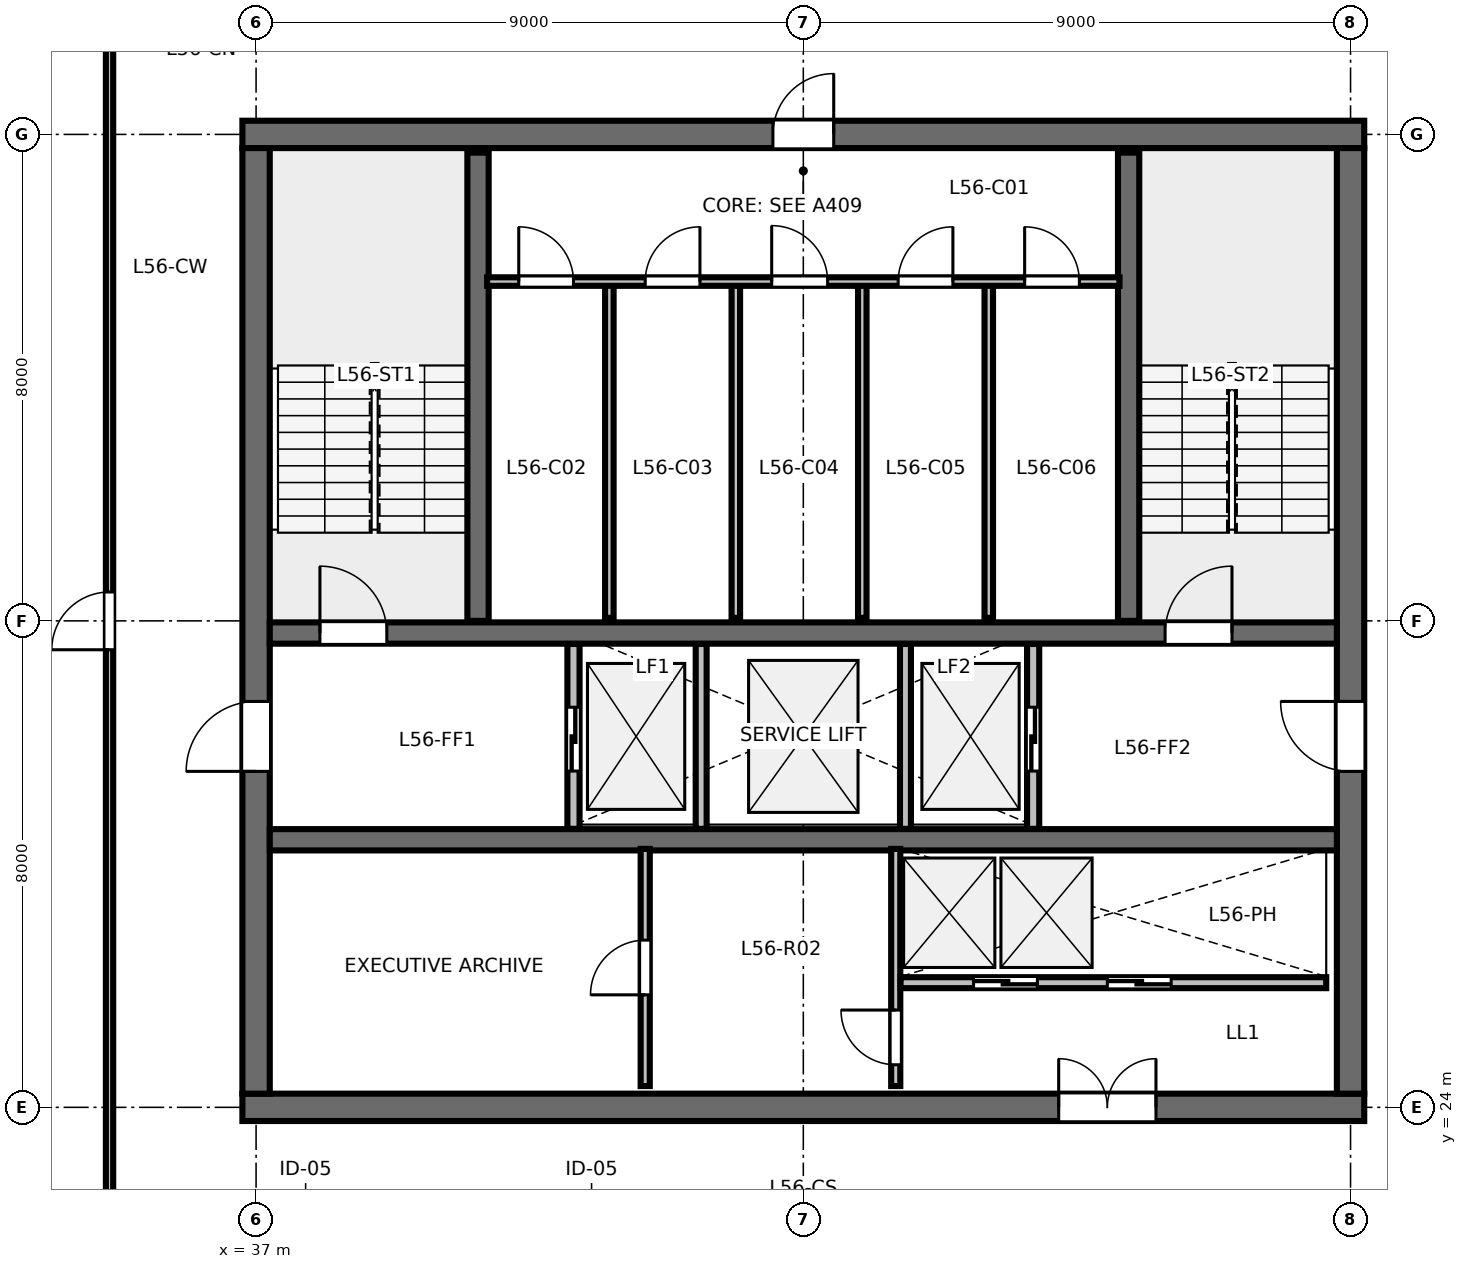
"""IFC4 building model, lengths in metres.
Left out: names, types, materials, properties, quantities, classifications, styles, units other than length and angle.
Written with IfcOpenShell. Run it as: python <this file> out.ifc"""

import sys

from ifc_helpers import new_model, si_unit, direction, frame, frame_2d, origin, place, context, subcontext, project, spatial, rectangle, extrude, element, fill, save


model = new_model("IFC4")
c1 = context("Model", 3, precision=1e-05, world=origin(), true_north=direction((0.0, 1.0)))
c2 = subcontext(c1, "Body", "Model", "MODEL_VIEW")
j1 = project(units=[si_unit("LENGTHUNIT", "METRE"), si_unit("PLANEANGLEUNIT", "RADIAN")], contexts=[c1])
p1 = place(None, origin())
s1 = spatial("IfcSite", under=j1, at=p1, CompositionType="ELEMENT")
p2 = place(p1, origin())
s2 = spatial("IfcBuilding", under=s1, at=p2, CompositionType="ELEMENT")
p3 = place(p2, frame((0.0, 0.0, 213.0)))
s3 = spatial("IfcBuildingStorey", under=s2, at=p3, CompositionType="ELEMENT", Elevation=213.0)
p4 = place(p3, frame((36.775, 24.0, 0.0), z_axis=(0.0, 0.0, 1.0), x_axis=(1.0, 0.0, 0.0)))
e1 = element("IfcWall", 1, at=p4, inside=s3, PredefinedType="SHEAR", context=c2, shape_type="SweptSolid", body=[
    extrude(rectangle(XDim=18.45, YDim=0.45, at=frame_2d((9.225, 0.0))), origin(), (0.0, 0.0, 1.0), 3.36),
])
p5 = place(p4, frame((13.425, 0.0, 0.0)))
e2 = element("IfcOpeningElement", 2, at=p5, cuts=e1, PredefinedType="OPENING", context=c2, shape_type="SweptSolid", body=[
    extrude(rectangle(XDim=1.6, YDim=2.15, at=frame_2d((0.8, 1.075))), frame((0.0, 0.235, 0.0), z_axis=(0.0, -1.0, 0.0), x_axis=(1.0, 0.0, 0.0)), (0.0, 0.0, 1.0), 0.47),
])
p6 = place(p3, frame((36.775, 40.0, 0.0), z_axis=(0.0, 0.0, 1.0), x_axis=(1.0, 0.0, 0.0)))
e3 = element("IfcWall", 3, at=p6, inside=s3, PredefinedType="SHEAR", context=c2, shape_type="SweptSolid", body=[
    extrude(rectangle(XDim=18.45, YDim=0.45, at=frame_2d((9.225, 0.0))), origin(), (0.0, 0.0, 1.0), 3.36),
])
p7 = place(p6, frame((8.725, 0.0, 0.0)))
e4 = element("IfcOpeningElement", 4, at=p7, cuts=e3, PredefinedType="OPENING", context=c2, shape_type="SweptSolid", body=[
    extrude(rectangle(XDim=1.0, YDim=2.15, at=frame_2d((0.5, 1.075))), frame((0.0, 0.235, 0.0), z_axis=(0.0, -1.0, 0.0), x_axis=(1.0, 0.0, 0.0)), (0.0, 0.0, 1.0), 0.47),
])
p8 = place(p3, frame((37.0, 24.225, 0.0), z_axis=(0.0, 0.0, 1.0), x_axis=(0.0, 1.0, 0.0)))
e5 = element("IfcWall", 5, at=p8, inside=s3, PredefinedType="SHEAR", context=c2, shape_type="SweptSolid", body=[
    extrude(rectangle(XDim=15.55, YDim=0.45, at=frame_2d((7.775, 0.0))), origin(), (0.0, 0.0, 1.0), 3.36),
])
p9 = place(p8, frame((5.3, 0.0, 0.0)))
e6 = element("IfcOpeningElement", 6, at=p9, cuts=e5, PredefinedType="OPENING", context=c2, shape_type="SweptSolid", body=[
    extrude(rectangle(XDim=1.15, YDim=2.15, at=frame_2d((0.575, 1.075))), frame((0.0, 0.235, 0.0), z_axis=(0.0, -1.0, 0.0), x_axis=(1.0, 0.0, 0.0)), (0.0, 0.0, 1.0), 0.47),
])
p10 = place(p3, frame((55.0, 24.225, 0.0), z_axis=(0.0, 0.0, 1.0), x_axis=(0.0, 1.0, 0.0)))
e7 = element("IfcWall", 7, at=p10, inside=s3, PredefinedType="SHEAR", context=c2, shape_type="SweptSolid", body=[
    extrude(rectangle(XDim=15.55, YDim=0.45, at=frame_2d((7.775, 0.0))), origin(), (0.0, 0.0, 1.0), 3.36),
])
p11 = place(p10, frame((5.3, 0.0, 0.0)))
e8 = element("IfcOpeningElement", 8, at=p11, cuts=e7, PredefinedType="OPENING", context=c2, shape_type="SweptSolid", body=[
    extrude(rectangle(XDim=1.15, YDim=2.15, at=frame_2d((0.575, 1.075))), frame((0.0, 0.235, 0.0), z_axis=(0.0, -1.0, 0.0), x_axis=(1.0, 0.0, 0.0)), (0.0, 0.0, 1.0), 0.47),
])
p12 = place(p3, frame((37.225, 31.8, 0.0), z_axis=(0.0, 0.0, 1.0), x_axis=(1.0, 0.0, 0.0)))
e9 = element("IfcWall", 9, at=p12, inside=s3, PredefinedType="SHEAR", context=c2, shape_type="SweptSolid", body=[
    extrude(rectangle(XDim=17.55, YDim=0.35, at=frame_2d((8.775, 0.0))), origin(), (0.0, 0.0, 1.0), 3.36),
])
p13 = place(p12, frame((0.825, 0.0, 0.0)))
e10 = element("IfcOpeningElement", 10, at=p13, cuts=e9, PredefinedType="OPENING", context=c2, shape_type="SweptSolid", body=[
    extrude(rectangle(XDim=1.1, YDim=2.15, at=frame_2d((0.55, 1.075))), frame((0.0, 0.185, 0.0), z_axis=(0.0, -1.0, 0.0), x_axis=(1.0, 0.0, 0.0)), (0.0, 0.0, 1.0), 0.37),
])
p14 = place(p12, frame((14.725, 0.0, 0.0)))
e11 = element("IfcOpeningElement", 11, at=p14, cuts=e9, PredefinedType="OPENING", context=c2, shape_type="SweptSolid", body=[
    extrude(rectangle(XDim=1.1, YDim=2.15, at=frame_2d((0.55, 1.075))), frame((0.0, 0.185, 0.0), z_axis=(0.0, -1.0, 0.0), x_axis=(1.0, 0.0, 0.0)), (0.0, 0.0, 1.0), 0.37),
])
p15 = place(p3, frame((37.225, 28.4, 0.0), z_axis=(0.0, 0.0, 1.0), x_axis=(1.0, 0.0, 0.0)))
e12 = element("IfcWall", 12, at=p15, inside=s3, PredefinedType="SHEAR", context=c2, shape_type="SweptSolid", body=[
    extrude(rectangle(XDim=17.55, YDim=0.35, at=frame_2d((8.775, 0.0))), origin(), (0.0, 0.0, 1.0), 3.36),
])
for number, where, z_axis, x_axis in (
    (13, (40.65, 32.0, 0.0), (0.0, 0.0, 1.0), (0.0, 1.0, 0.0)),
    (14, (51.35, 32.0, 0.0), (0.0, 0.0, 1.0), (0.0, 1.0, 0.0)),
):
    element("IfcWall", number, at=place(p3, frame(where, z_axis=z_axis, x_axis=x_axis)), inside=s3, PredefinedType="SHEAR", context=c2, shape_type="SweptSolid", body=[
        extrude(rectangle(XDim=7.7, YDim=0.35, at=frame_2d((3.85, 0.0))), origin(), (0.0, 0.0, 1.0), 3.6),
    ])
for number, where, z_axis, x_axis in (
    (15, (42.81, 32.05, 0.0), (0.0, 0.0, 1.0), (0.0, 1.0, 0.0)),
    (16, (44.89, 32.05, 0.0), (0.0, 0.0, 1.0), (0.0, 1.0, 0.0)),
    (17, (46.97, 32.05, 0.0), (0.0, 0.0, 1.0), (0.0, 1.0, 0.0)),
    (18, (49.05, 32.05, 0.0), (0.0, 0.0, 1.0), (0.0, 1.0, 0.0)),
):
    element("IfcWall", number, at=place(p3, frame(where, z_axis=z_axis, x_axis=x_axis)), inside=s3, PredefinedType="PARTITIONING", context=c2, shape_type="SweptSolid", body=[
        extrude(rectangle(XDim=5.5, YDim=0.14, at=frame_2d((2.75, 0.0))), origin(), (0.0, 0.0, 1.0), 3.375),
    ])
p16 = place(p3, frame((40.8, 37.58, 0.0), z_axis=(0.0, 0.0, 1.0), x_axis=(1.0, 0.0, 0.0)))
e19 = element("IfcWall", 19, at=p16, inside=s3, PredefinedType="PARTITIONING", context=c2, shape_type="SweptSolid", body=[
    extrude(rectangle(XDim=10.4, YDim=0.14, at=frame_2d((5.2, 0.0))), origin(), (0.0, 0.0, 1.0), 3.375),
])
p17 = place(p16, frame((0.52, 0.0, 0.0)))
e20 = element("IfcOpeningElement", 20, at=p17, cuts=e19, PredefinedType="OPENING", context=c2, shape_type="SweptSolid", body=[
    extrude(rectangle(XDim=0.9, YDim=2.15, at=frame_2d((0.45, 1.075))), frame((0.0, 0.08, 0.0), z_axis=(0.0, -1.0, 0.0), x_axis=(1.0, 0.0, 0.0)), (0.0, 0.0, 1.0), 0.16),
])
p18 = place(p16, frame((2.6, 0.0, 0.0)))
e21 = element("IfcOpeningElement", 21, at=p18, cuts=e19, PredefinedType="OPENING", context=c2, shape_type="SweptSolid", body=[
    extrude(rectangle(XDim=0.9, YDim=2.15, at=frame_2d((0.45, 1.075))), frame((0.0, 0.08, 0.0), z_axis=(0.0, -1.0, 0.0), x_axis=(1.0, 0.0, 0.0)), (0.0, 0.0, 1.0), 0.16),
])
p19 = place(p16, frame((4.68, 0.0, 0.0)))
e22 = element("IfcOpeningElement", 22, at=p19, cuts=e19, PredefinedType="OPENING", context=c2, shape_type="SweptSolid", body=[
    extrude(rectangle(XDim=0.92, YDim=2.15, at=frame_2d((0.46, 1.075))), frame((0.0, 0.08, 0.0), z_axis=(0.0, -1.0, 0.0), x_axis=(1.0, 0.0, 0.0)), (0.0, 0.0, 1.0), 0.16),
])
p20 = place(p16, frame((6.76, 0.0, 0.0)))
e23 = element("IfcOpeningElement", 23, at=p20, cuts=e19, PredefinedType="OPENING", context=c2, shape_type="SweptSolid", body=[
    extrude(rectangle(XDim=0.9, YDim=2.15, at=frame_2d((0.45, 1.075))), frame((0.0, 0.08, 0.0), z_axis=(0.0, -1.0, 0.0), x_axis=(1.0, 0.0, 0.0)), (0.0, 0.0, 1.0), 0.16),
])
p21 = place(p16, frame((8.84, 0.0, 0.0)))
e24 = element("IfcOpeningElement", 24, at=p21, cuts=e19, PredefinedType="OPENING", context=c2, shape_type="SweptSolid", body=[
    extrude(rectangle(XDim=0.9, YDim=2.15, at=frame_2d((0.45, 1.075))), frame((0.0, 0.08, 0.0), z_axis=(0.0, -1.0, 0.0), x_axis=(1.0, 0.0, 0.0)), (0.0, 0.0, 1.0), 0.16),
])
p22 = place(p3, frame((42.22, 28.58, 0.0), z_axis=(0.0, 0.0, 1.0), x_axis=(0.0, 1.0, 0.0)))
e25 = element("IfcWall", 25, at=p22, inside=s3, PredefinedType="PARTITIONING", context=c2, shape_type="SweptSolid", body=[
    extrude(rectangle(XDim=3.04, YDim=0.2, at=frame_2d((1.52, 0.0))), origin(), (0.0, 0.0, 1.0), 3.375),
])
p23 = place(p22, frame((0.95, 0.0, 0.0)))
e26 = element("IfcOpeningElement", 26, at=p23, cuts=e25, PredefinedType="OPENING", context=c2, shape_type="SweptSolid", body=[
    extrude(rectangle(XDim=1.05, YDim=2.15, at=frame_2d((0.525, 1.075))), frame((0.0, 0.11, 0.0), z_axis=(0.0, -1.0, 0.0), x_axis=(1.0, 0.0, 0.0)), (0.0, 0.0, 1.0), 0.22),
])
p24 = place(p3, frame((49.78, 28.58, 0.0), z_axis=(0.0, 0.0, 1.0), x_axis=(0.0, 1.0, 0.0)))
e27 = element("IfcWall", 27, at=p24, inside=s3, PredefinedType="PARTITIONING", context=c2, shape_type="SweptSolid", body=[
    extrude(rectangle(XDim=3.04, YDim=0.2, at=frame_2d((1.52, 0.0))), origin(), (0.0, 0.0, 1.0), 3.375),
])
p25 = place(p24, frame((0.95, 0.0, 0.0)))
e28 = element("IfcOpeningElement", 28, at=p25, cuts=e27, PredefinedType="OPENING", context=c2, shape_type="SweptSolid", body=[
    extrude(rectangle(XDim=1.05, YDim=2.15, at=frame_2d((0.525, 1.075))), frame((0.0, 0.11, 0.0), z_axis=(0.0, -1.0, 0.0), x_axis=(1.0, 0.0, 0.0)), (0.0, 0.0, 1.0), 0.22),
])
for number, where, z_axis, x_axis in (
    (29, (44.32, 28.58, 0.0), (0.0, 0.0, 1.0), (0.0, 1.0, 0.0)),
    (30, (47.68, 28.58, 0.0), (0.0, 0.0, 1.0), (0.0, 1.0, 0.0)),
):
    element("IfcWall", number, at=place(p3, frame(where, z_axis=z_axis, x_axis=x_axis)), inside=s3, PredefinedType="PARTITIONING", context=c2, shape_type="SweptSolid", body=[
        extrude(rectangle(XDim=3.04, YDim=0.18, at=frame_2d((1.52, 0.0))), origin(), (0.0, 0.0, 1.0), 3.375),
    ])
p26 = place(p3, frame((43.4, 24.35, 0.0), z_axis=(0.0, 0.0, 1.0), x_axis=(0.0, 1.0, 0.0)))
e31 = element("IfcWall", 31, at=p26, inside=s3, PredefinedType="PARTITIONING", context=c2, shape_type="SweptSolid", body=[
    extrude(rectangle(XDim=3.9, YDim=0.15, at=frame_2d((1.95, 0.0))), origin(), (0.0, 0.0, 1.0), 3.375),
])
p27 = place(p26, frame((1.5, 0.0, 0.0)))
e32 = element("IfcOpeningElement", 32, at=p27, cuts=e31, PredefinedType="OPENING", context=c2, shape_type="SweptSolid", body=[
    extrude(rectangle(XDim=0.9, YDim=2.15, at=frame_2d((0.45, 1.075))), frame((0.0, 0.085, 0.0), z_axis=(0.0, -1.0, 0.0), x_axis=(1.0, 0.0, 0.0)), (0.0, 0.0, 1.0), 0.17),
])
p28 = place(p3, frame((47.52, 24.35, 0.0), z_axis=(0.0, 0.0, 1.0), x_axis=(0.0, 1.0, 0.0)))
e33 = element("IfcWall", 33, at=p28, inside=s3, PredefinedType="PARTITIONING", context=c2, shape_type="SweptSolid", body=[
    extrude(rectangle(XDim=3.9, YDim=0.15, at=frame_2d((1.95, 0.0))), origin(), (0.0, 0.0, 1.0), 3.375),
])
p29 = place(p28, frame((0.35, 0.0, 0.0)))
e34 = element("IfcOpeningElement", 34, at=p29, cuts=e33, PredefinedType="OPENING", context=c2, shape_type="SweptSolid", body=[
    extrude(rectangle(XDim=0.9, YDim=2.15, at=frame_2d((0.45, 1.075))), frame((0.0, 0.085, 0.0), z_axis=(0.0, -1.0, 0.0), x_axis=(1.0, 0.0, 0.0)), (0.0, 0.0, 1.0), 0.17),
])
p30 = place(p3, frame((47.6, 26.05, 0.0), z_axis=(0.0, 0.0, 1.0), x_axis=(1.0, 0.0, 0.0)))
e35 = element("IfcWall", 35, at=p30, inside=s3, PredefinedType="PARTITIONING", context=c2, shape_type="SweptSolid", body=[
    extrude(rectangle(XDim=7.0, YDim=0.18, at=frame_2d((3.5, 0.0))), origin(), (0.0, 0.0, 1.0), 3.375),
])
p31 = place(p30, frame((1.2, 0.0, 0.0)))
e36 = element("IfcOpeningElement", 36, at=p31, cuts=e35, PredefinedType="OPENING", context=c2, shape_type="SweptSolid", body=[
    extrude(rectangle(XDim=1.05, YDim=2.15, at=frame_2d((0.525, 1.075))), frame((0.0, 0.1, 0.0), z_axis=(0.0, -1.0, 0.0), x_axis=(1.0, 0.0, 0.0)), (0.0, 0.0, 1.0), 0.2),
])
p32 = place(p30, frame((3.4, 0.0, 0.0)))
e37 = element("IfcOpeningElement", 37, at=p32, cuts=e35, PredefinedType="OPENING", context=c2, shape_type="SweptSolid", body=[
    extrude(rectangle(XDim=1.05, YDim=2.15, at=frame_2d((0.525, 1.075))), frame((0.0, 0.1, 0.0), z_axis=(0.0, -1.0, 0.0), x_axis=(1.0, 0.0, 0.0)), (0.0, 0.0, 1.0), 0.2),
])
p33 = place(p3, frame((34.59, 21.65, 0.0), z_axis=(0.0, 0.0, 1.0), x_axis=(0.0, 1.0, 0.0)))
e38 = element("IfcWall", 38, at=p33, inside=s3, PredefinedType="PARTITIONING", context=c2, shape_type="SweptSolid", body=[
    extrude(rectangle(XDim=20.7, YDim=0.12, at=frame_2d((10.35, 0.0))), origin(), (0.0, 0.0, 1.0), 2.655),
])
p34 = place(p33, frame((9.875, 0.0, 0.0)))
e39 = element("IfcOpeningElement", 39, at=p34, cuts=e38, PredefinedType="OPENING", context=c2, shape_type="SweptSolid", body=[
    extrude(rectangle(XDim=0.95, YDim=2.15, at=frame_2d((0.475, 1.075))), frame((0.0, 0.07, 0.0), z_axis=(0.0, -1.0, 0.0), x_axis=(1.0, 0.0, 0.0)), (0.0, 0.0, 1.0), 0.14),
])
p35 = place(p13, origin())
e40 = element("IfcDoor", 40, at=p35, inside=s3, OperationType="SINGLE_SWING_LEFT", PredefinedType="DOOR", context=c2, shape_type="SweptSolid", body=[
    extrude(rectangle(XDim=1.1, YDim=2.15, at=frame_2d((0.55, 1.075))), frame((0.0, 0.025, 0.0), z_axis=(0.0, -1.0, 0.0), x_axis=(1.0, 0.0, 0.0)), (0.0, 0.0, 1.0), 0.05),
])
fill(e10, e40)
p36 = place(p14, origin())
e41 = element("IfcDoor", 41, at=p36, inside=s3, OperationType="SINGLE_SWING_RIGHT", PredefinedType="DOOR", context=c2, shape_type="SweptSolid", body=[
    extrude(rectangle(XDim=1.1, YDim=2.15, at=frame_2d((0.55, 1.075))), frame((0.0, 0.025, 0.0), z_axis=(0.0, -1.0, 0.0), x_axis=(1.0, 0.0, 0.0)), (0.0, 0.0, 1.0), 0.05),
])
fill(e11, e41)
p37 = place(p7, origin())
e42 = element("IfcDoor", 42, at=p37, inside=s3, OperationType="SINGLE_SWING_RIGHT", PredefinedType="DOOR", context=c2, shape_type="SweptSolid", body=[
    extrude(rectangle(XDim=1.0, YDim=2.15, at=frame_2d((0.5, 1.075))), frame((0.0, 0.025, 0.0), z_axis=(0.0, -1.0, 0.0), x_axis=(1.0, 0.0, 0.0)), (0.0, 0.0, 1.0), 0.05),
])
fill(e4, e42)
p38 = place(p9, origin())
e43 = element("IfcDoor", 43, at=p38, inside=s3, OperationType="SINGLE_SWING_LEFT", PredefinedType="DOOR", context=c2, shape_type="SweptSolid", body=[
    extrude(rectangle(XDim=1.15, YDim=2.15, at=frame_2d((0.575, 1.075))), frame((0.0, 0.025, 0.0), z_axis=(0.0, -1.0, 0.0), x_axis=(1.0, 0.0, 0.0)), (0.0, 0.0, 1.0), 0.05),
])
fill(e6, e43)
p39 = place(p11, origin())
e44 = element("IfcDoor", 44, at=p39, inside=s3, OperationType="SINGLE_SWING_RIGHT", PredefinedType="DOOR", context=c2, shape_type="SweptSolid", body=[
    extrude(rectangle(XDim=1.15, YDim=2.15, at=frame_2d((0.575, 1.075))), frame((0.0, 0.025, 0.0), z_axis=(0.0, -1.0, 0.0), x_axis=(1.0, 0.0, 0.0)), (0.0, 0.0, 1.0), 0.05),
])
fill(e8, e44)
p40 = place(p5, origin())
e45 = element("IfcDoor", 45, at=p40, inside=s3, OperationType="DOUBLE_DOOR_SINGLE_SWING", PredefinedType="DOOR", context=c2, shape_type="SweptSolid", body=[
    extrude(rectangle(XDim=1.6, YDim=2.15, at=frame_2d((0.8, 1.075))), frame((0.0, 0.025, 0.0), z_axis=(0.0, -1.0, 0.0), x_axis=(1.0, 0.0, 0.0)), (0.0, 0.0, 1.0), 0.05),
])
fill(e2, e45)
p41 = place(p17, origin())
e46 = element("IfcDoor", 46, at=p41, inside=s3, OperationType="SINGLE_SWING_LEFT", PredefinedType="DOOR", context=c2, shape_type="SweptSolid", body=[
    extrude(rectangle(XDim=0.9, YDim=2.15, at=frame_2d((0.45, 1.075))), frame((0.0, 0.025, 0.0), z_axis=(0.0, -1.0, 0.0), x_axis=(1.0, 0.0, 0.0)), (0.0, 0.0, 1.0), 0.05),
])
fill(e20, e46)
p42 = place(p18, origin())
e47 = element("IfcDoor", 47, at=p42, inside=s3, OperationType="SINGLE_SWING_RIGHT", PredefinedType="DOOR", context=c2, shape_type="SweptSolid", body=[
    extrude(rectangle(XDim=0.9, YDim=2.15, at=frame_2d((0.45, 1.075))), frame((0.0, 0.025, 0.0), z_axis=(0.0, -1.0, 0.0), x_axis=(1.0, 0.0, 0.0)), (0.0, 0.0, 1.0), 0.05),
])
fill(e21, e47)
p43 = place(p19, origin())
e48 = element("IfcDoor", 48, at=p43, inside=s3, OperationType="SINGLE_SWING_LEFT", PredefinedType="DOOR", context=c2, shape_type="SweptSolid", body=[
    extrude(rectangle(XDim=0.92, YDim=2.15, at=frame_2d((0.46, 1.075))), frame((0.0, 0.025, 0.0), z_axis=(0.0, -1.0, 0.0), x_axis=(1.0, 0.0, 0.0)), (0.0, 0.0, 1.0), 0.05),
])
fill(e22, e48)
p44 = place(p20, origin())
e49 = element("IfcDoor", 49, at=p44, inside=s3, OperationType="SINGLE_SWING_RIGHT", PredefinedType="DOOR", context=c2, shape_type="SweptSolid", body=[
    extrude(rectangle(XDim=0.9, YDim=2.15, at=frame_2d((0.45, 1.075))), frame((0.0, 0.025, 0.0), z_axis=(0.0, -1.0, 0.0), x_axis=(1.0, 0.0, 0.0)), (0.0, 0.0, 1.0), 0.05),
])
fill(e23, e49)
p45 = place(p21, origin())
e50 = element("IfcDoor", 50, at=p45, inside=s3, OperationType="SINGLE_SWING_LEFT", PredefinedType="DOOR", context=c2, shape_type="SweptSolid", body=[
    extrude(rectangle(XDim=0.9, YDim=2.15, at=frame_2d((0.45, 1.075))), frame((0.0, 0.025, 0.0), z_axis=(0.0, -1.0, 0.0), x_axis=(1.0, 0.0, 0.0)), (0.0, 0.0, 1.0), 0.05),
])
fill(e24, e50)
p46 = place(p23, origin())
e51 = element("IfcDoor", 51, at=p46, inside=s3, OperationType="SLIDING_TO_LEFT", PredefinedType="DOOR", context=c2, shape_type="SweptSolid", body=[
    extrude(rectangle(XDim=1.05, YDim=2.15, at=frame_2d((0.525, 1.075))), frame((0.0, 0.025, 0.0), z_axis=(0.0, -1.0, 0.0), x_axis=(1.0, 0.0, 0.0)), (0.0, 0.0, 1.0), 0.05),
])
fill(e26, e51)
p47 = place(p25, origin())
e52 = element("IfcDoor", 52, at=p47, inside=s3, OperationType="SLIDING_TO_RIGHT", PredefinedType="DOOR", context=c2, shape_type="SweptSolid", body=[
    extrude(rectangle(XDim=1.05, YDim=2.15, at=frame_2d((0.525, 1.075))), frame((0.0, 0.025, 0.0), z_axis=(0.0, -1.0, 0.0), x_axis=(1.0, 0.0, 0.0)), (0.0, 0.0, 1.0), 0.05),
])
fill(e28, e52)
p48 = place(p27, origin())
e53 = element("IfcDoor", 53, at=p48, inside=s3, OperationType="SINGLE_SWING_LEFT", PredefinedType="DOOR", context=c2, shape_type="SweptSolid", body=[
    extrude(rectangle(XDim=0.9, YDim=2.15, at=frame_2d((0.45, 1.075))), frame((0.0, 0.025, 0.0), z_axis=(0.0, -1.0, 0.0), x_axis=(1.0, 0.0, 0.0)), (0.0, 0.0, 1.0), 0.05),
])
fill(e32, e53)
p49 = place(p29, origin())
e54 = element("IfcDoor", 54, at=p49, inside=s3, OperationType="SINGLE_SWING_RIGHT", PredefinedType="DOOR", context=c2, shape_type="SweptSolid", body=[
    extrude(rectangle(XDim=0.9, YDim=2.15, at=frame_2d((0.45, 1.075))), frame((0.0, 0.025, 0.0), z_axis=(0.0, -1.0, 0.0), x_axis=(1.0, 0.0, 0.0)), (0.0, 0.0, 1.0), 0.05),
])
fill(e34, e54)
p50 = place(p31, origin())
e55 = element("IfcDoor", 55, at=p50, inside=s3, OperationType="SLIDING_TO_LEFT", PredefinedType="DOOR", context=c2, shape_type="SweptSolid", body=[
    extrude(rectangle(XDim=1.05, YDim=2.15, at=frame_2d((0.525, 1.075))), frame((0.0, 0.025, 0.0), z_axis=(0.0, -1.0, 0.0), x_axis=(1.0, 0.0, 0.0)), (0.0, 0.0, 1.0), 0.05),
])
fill(e36, e55)
p51 = place(p32, origin())
e56 = element("IfcDoor", 56, at=p51, inside=s3, OperationType="SLIDING_TO_RIGHT", PredefinedType="DOOR", context=c2, shape_type="SweptSolid", body=[
    extrude(rectangle(XDim=1.05, YDim=2.15, at=frame_2d((0.525, 1.075))), frame((0.0, 0.025, 0.0), z_axis=(0.0, -1.0, 0.0), x_axis=(1.0, 0.0, 0.0)), (0.0, 0.0, 1.0), 0.05),
])
fill(e37, e56)
p52 = place(p34, origin())
e57 = element("IfcDoor", 57, at=p52, inside=s3, OperationType="SINGLE_SWING_LEFT", PredefinedType="DOOR", context=c2, shape_type="SweptSolid", body=[
    extrude(rectangle(XDim=0.95, YDim=2.15, at=frame_2d((0.475, 1.075))), frame((0.0, 0.025, 0.0), z_axis=(0.0, -1.0, 0.0), x_axis=(1.0, 0.0, 0.0)), (0.0, 0.0, 1.0), 0.05),
])
fill(e39, e57)
save(model, sys.argv[1])
